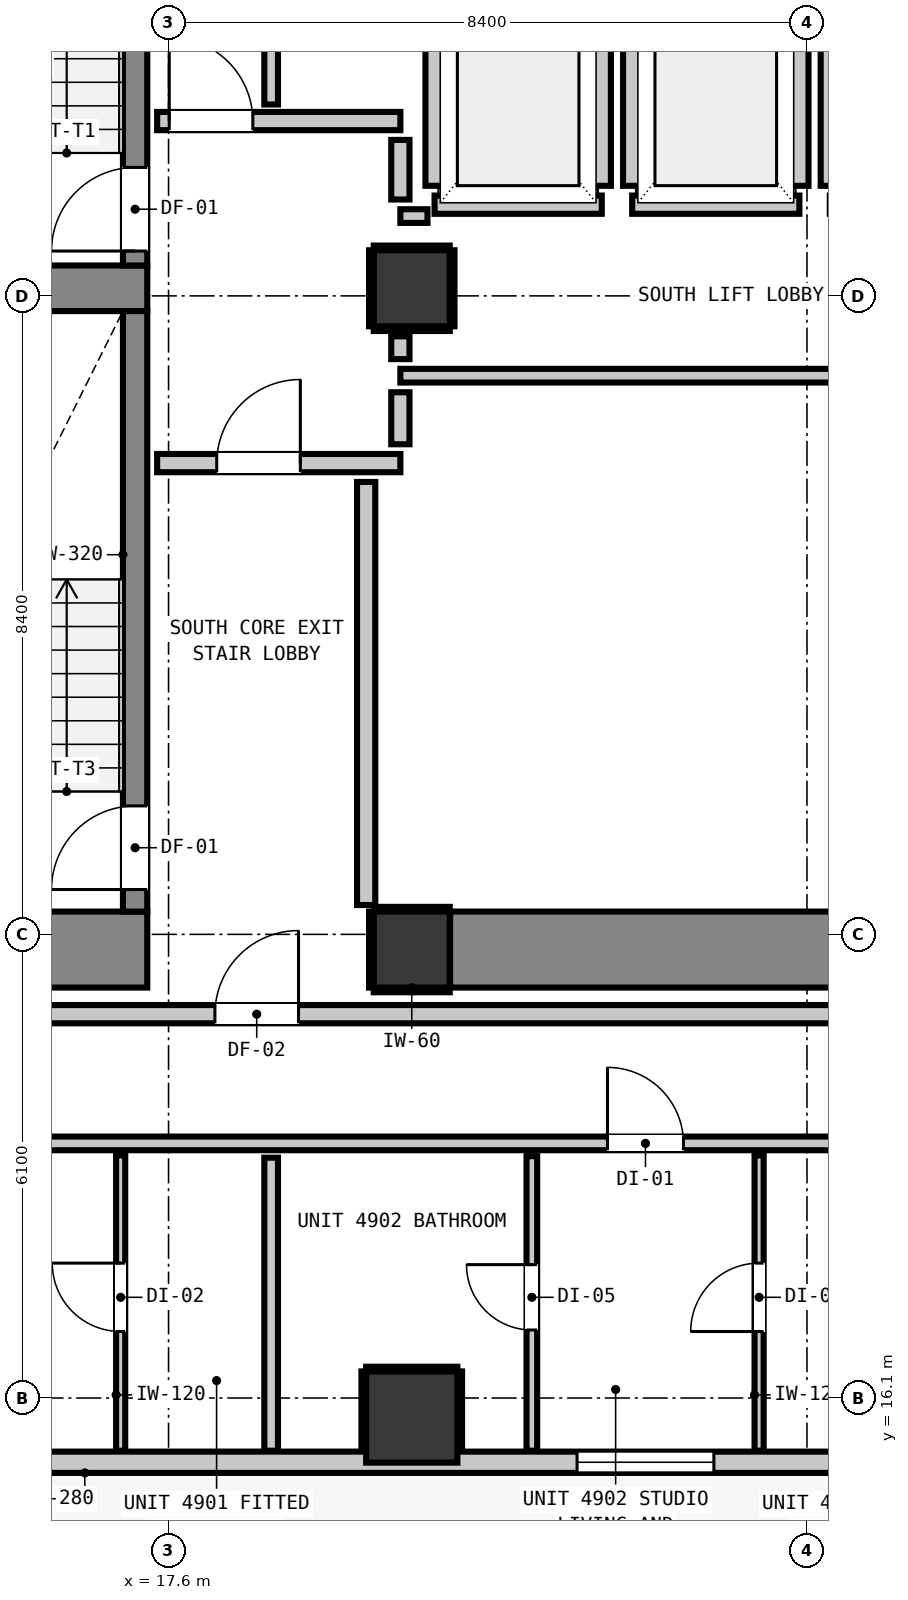
"""IFC4 building model, lengths in metres.
Left out: names, types, materials, properties, quantities, classifications, styles, units other than length and angle.
Written with IfcOpenShell. Run it as: python <this file> out.ifc"""

import sys

from ifc_helpers import new_model, si_unit, direction, frame, frame_2d, origin, origin_2d, place, context, subcontext, project, spatial, rectangle, extrude, element, fill, save


model = new_model("IFC4")
c1 = context("Model", 3, precision=1e-05, world=origin(), true_north=direction((0.0, 1.0)))
c2 = subcontext(c1, "Body", "Model", "MODEL_VIEW")
j1 = project(units=[si_unit("LENGTHUNIT", "METRE"), si_unit("PLANEANGLEUNIT", "RADIAN")], contexts=[c1])
p1 = place(None, origin())
s1 = spatial("IfcSite", under=j1, at=p1, CompositionType="ELEMENT")
p2 = place(p1, origin())
s2 = spatial("IfcBuilding", under=s1, at=p2, CompositionType="ELEMENT")
p3 = place(p2, frame((0.0, 0.0, 169.16)))
s3 = spatial("IfcBuildingStorey", under=s2, at=p3, CompositionType="ELEMENT", Elevation=169.16)
p4 = place(p3, frame((20.8, 22.0, 0.0), z_axis=(0.0, 0.0, 1.0), x_axis=(1.0, 0.0, 0.0)))
e1 = element("IfcColumn", 1, at=p4, inside=s3, PredefinedType="COLUMN", context=c2, shape_type="SweptSolid", body=[
    extrude(rectangle(XDim=1.0, YDim=1.0, at=origin_2d()), origin(), (0.0, 0.0, 1.0), 3.32),
])
p5 = place(p3, frame((13.24, 22.0, 0.0), z_axis=(0.0, 0.0, 1.0), x_axis=(1.0, 0.0, 0.0)))
e2 = element("IfcWall", 2, at=p5, inside=s3, PredefinedType="SHEAR", context=c2, shape_type="SweptSolid", body=[
    extrude(rectangle(XDim=4.08, YDim=1.0, at=frame_2d((2.04, 0.0))), origin(), (0.0, 0.0, 1.0), 3.32),
])
p6 = place(p3, frame((13.905, 30.7, 0.0), z_axis=(0.0, 0.0, 1.0), x_axis=(1.0, 0.0, 0.0)))
e3 = element("IfcWall", 3, at=p6, inside=s3, PredefinedType="SHEAR", context=c2, shape_type="SweptSolid", body=[
    extrude(rectangle(XDim=3.415, YDim=0.6, at=frame_2d((1.708, 0.0))), origin(), (0.0, 0.0, 1.0), 3.32),
])
p7 = place(p3, frame((21.305, 22.0, 0.0), z_axis=(0.0, 0.0, 1.0), x_axis=(1.0, 0.0, 0.0)))
e4 = element("IfcWall", 4, at=p7, inside=s3, PredefinedType="SHEAR", context=c2, shape_type="SweptSolid", body=[
    extrude(rectangle(XDim=7.39, YDim=1.0, at=frame_2d((3.695, 0.0))), origin(), (0.0, 0.0, 1.0), 3.32),
])
p8 = place(p3, frame((17.16, 31.0, 0.0), z_axis=(0.0, 0.0, 1.0), x_axis=(0.0, 1.0, 0.0)))
e5 = element("IfcWall", 5, at=p8, inside=s3, PredefinedType="SHEAR", context=c2, shape_type="SweptSolid", body=[
    extrude(rectangle(XDim=7.8, YDim=0.32, at=frame_2d((3.9, 0.0))), origin(), (0.0, 0.0, 1.0), 3.32),
])
p9 = place(p8, frame((0.19, 0.0, 0.0)))
e6 = element("IfcOpeningElement", 6, at=p9, cuts=e5, PredefinedType="OPENING", context=c2, shape_type="SweptSolid", body=[
    extrude(rectangle(XDim=1.1, YDim=2.15, at=frame_2d((0.55, 1.075))), frame((0.0, 0.17, 0.0), z_axis=(0.0, -1.0, 0.0), x_axis=(1.0, 0.0, 0.0)), (0.0, 0.0, 1.0), 0.34),
])
p10 = place(p3, frame((17.16, 22.5, 0.0), z_axis=(0.0, 0.0, 1.0), x_axis=(0.0, 1.0, 0.0)))
e7 = element("IfcWall", 7, at=p10, inside=s3, PredefinedType="SHEAR", context=c2, shape_type="SweptSolid", body=[
    extrude(rectangle(XDim=7.9, YDim=0.32, at=frame_2d((3.95, 0.0))), origin(), (0.0, 0.0, 1.0), 3.32),
])
p11 = place(p10, frame((0.29, 0.0, 0.0)))
e8 = element("IfcOpeningElement", 8, at=p11, cuts=e7, PredefinedType="OPENING", context=c2, shape_type="SweptSolid", body=[
    extrude(rectangle(XDim=1.1, YDim=2.15, at=frame_2d((0.55, 1.075))), frame((0.0, 0.17, 0.0), z_axis=(0.0, -1.0, 0.0), x_axis=(1.0, 0.0, 0.0)), (0.0, 0.0, 1.0), 0.34),
])
p12 = place(p3, frame((20.8, 30.7, 0.0), z_axis=(0.0, 0.0, 1.0), x_axis=(1.0, 0.0, 0.0)))
e9 = element("IfcColumn", 9, at=p12, inside=s3, PredefinedType="COLUMN", context=c2, shape_type="SweptSolid", body=[
    extrude(rectangle(XDim=1.0, YDim=1.0, at=origin_2d()), origin(), (0.0, 0.0, 1.0), 3.32),
])
p13 = place(p3, frame((20.8, 15.85, 0.0), z_axis=(0.0, 0.0, 1.0), x_axis=(1.0, 0.0, 0.0)))
e10 = element("IfcColumn", 10, at=p13, inside=s3, PredefinedType="COLUMN", context=c2, shape_type="SweptSolid", body=[
    extrude(rectangle(XDim=1.2, YDim=1.2, at=origin_2d()), origin(), (0.0, 0.0, 1.0), 3.32),
])
p14 = place(p3, frame((40.445, 15.255, 0.0), z_axis=(0.0, 0.0, 1.0), x_axis=(-1.0, 0.0, 0.0)))
e11 = element("IfcWall", 11, at=p14, inside=s3, PredefinedType="STANDARD", context=c2, shape_type="SweptSolid", body=[
    extrude(rectangle(XDim=35.09, YDim=0.28, at=frame_2d((17.545, 0.0))), origin(), (0.0, 0.0, 1.0), 2.96),
])
p15 = place(p14, frame((0.904, 0.0, 0.0)))
e12 = element("IfcOpeningElement", 12, at=p15, cuts=e11, PredefinedType="OPENING", context=c2, shape_type="SweptSolid", body=[
    extrude(rectangle(XDim=1.0, YDim=2.15, at=frame_2d((0.5, 1.075))), frame((0.0, 0.15, 0.0), z_axis=(0.0, -1.0, 0.0), x_axis=(1.0, 0.0, 0.0)), (0.0, 0.0, 1.0), 0.3),
])
p16 = place(p14, frame((30.423, 0.0, 0.85)))
e13 = element("IfcOpeningElement", 13, at=p16, cuts=e11, PredefinedType="OPENING", context=c2, shape_type="SweptSolid", body=[
    extrude(rectangle(XDim=1.8, YDim=1.9, at=frame_2d((0.9, 0.95))), frame((0.0, 0.15, 0.0), z_axis=(0.0, -1.0, 0.0), x_axis=(1.0, 0.0, 0.0)), (0.0, 0.0, 1.0), 0.3),
])
p17 = place(p14, frame((15.67, 0.0, 0.85)))
e14 = element("IfcOpeningElement", 14, at=p17, cuts=e11, PredefinedType="OPENING", context=c2, shape_type="SweptSolid", body=[
    extrude(rectangle(XDim=1.8, YDim=1.9, at=frame_2d((0.9, 0.95))), frame((0.0, 0.15, 0.0), z_axis=(0.0, -1.0, 0.0), x_axis=(1.0, 0.0, 0.0)), (0.0, 0.0, 1.0), 0.3),
])
p18 = place(p14, frame((6.155, 0.0, 0.85)))
e15 = element("IfcOpeningElement", 15, at=p18, cuts=e11, PredefinedType="OPENING", context=c2, shape_type="SweptSolid", body=[
    extrude(rectangle(XDim=1.8, YDim=1.9, at=frame_2d((0.9, 0.95))), frame((0.0, 0.15, 0.0), z_axis=(0.0, -1.0, 0.0), x_axis=(1.0, 0.0, 0.0)), (0.0, 0.0, 1.0), 0.3),
])
p19 = place(p3, frame((21.1, 31.8, 0.0), z_axis=(0.0, 0.0, 1.0), x_axis=(1.0, 0.0, 0.0)))
e16 = element("IfcWall", 16, at=p19, inside=s3, PredefinedType="PARTITIONING", context=c2, shape_type="SweptSolid", body=[
    extrude(rectangle(XDim=2.2, YDim=0.24, at=frame_2d((1.1, 0.0))), origin(), (0.0, 0.0, 1.0), 2.96),
])
p20 = place(p3, frame((21.1, 32.048, 0.0), z_axis=(0.0, 0.0, 1.0), x_axis=(0.0, 1.0, 0.0)))
e17 = element("IfcWall", 17, at=p20, inside=s3, PredefinedType="PARTITIONING", context=c2, shape_type="SweptSolid", body=[
    extrude(rectangle(XDim=2.104, YDim=0.24, at=frame_2d((1.052, 0.0))), origin(), (0.0, 0.0, 1.0), 2.195),
])
p21 = place(p3, frame((23.3, 32.048, 0.0), z_axis=(0.0, 0.0, 1.0), x_axis=(0.0, 1.0, 0.0)))
e18 = element("IfcWall", 18, at=p21, inside=s3, PredefinedType="PARTITIONING", context=c2, shape_type="SweptSolid", body=[
    extrude(rectangle(XDim=2.104, YDim=0.24, at=frame_2d((1.052, 0.0))), origin(), (0.0, 0.0, 1.0), 2.96),
])
p22 = place(p3, frame((23.7, 31.8, 0.0), z_axis=(0.0, 0.0, 1.0), x_axis=(1.0, 0.0, 0.0)))
e19 = element("IfcWall", 19, at=p22, inside=s3, PredefinedType="PARTITIONING", context=c2, shape_type="SweptSolid", body=[
    extrude(rectangle(XDim=2.2, YDim=0.24, at=frame_2d((1.1, 0.0))), origin(), (0.0, 0.0, 1.0), 2.96),
])
for number, where, z_axis, x_axis in (
    (20, (23.7, 32.048, 0.0), (0.0, 0.0, 1.0), (0.0, 1.0, 0.0)),
    (21, (25.9, 32.048, 0.0), (0.0, 0.0, 1.0), (0.0, 1.0, 0.0)),
    (22, (26.3, 32.048, 0.0), (0.0, 0.0, 1.0), (0.0, 1.0, 0.0)),
):
    element("IfcWall", number, at=place(p3, frame(where, z_axis=z_axis, x_axis=x_axis)), inside=s3, PredefinedType="PARTITIONING", context=c2, shape_type="SweptSolid", body=[
        extrude(rectangle(XDim=2.104, YDim=0.24, at=frame_2d((1.052, 0.0))), origin(), (0.0, 0.0, 1.0), 2.96),
    ])
p23 = place(p3, frame((12.983, 21.15, 0.0), z_axis=(0.0, 0.0, 1.0), x_axis=(1.0, 0.0, 0.0)))
e23 = element("IfcWall", 23, at=p23, inside=s3, PredefinedType="PARTITIONING", context=c2, shape_type="SweptSolid", body=[
    extrude(rectangle(XDim=29.61, YDim=0.24, at=frame_2d((14.805, 0.0))), origin(), (0.0, 0.0, 1.0), 2.96),
])
p24 = place(p23, frame((5.227, 0.0, 0.0)))
e24 = element("IfcOpeningElement", 24, at=p24, cuts=e23, PredefinedType="OPENING", context=c2, shape_type="SweptSolid", body=[
    extrude(rectangle(XDim=1.1, YDim=2.15, at=frame_2d((0.55, 1.075))), frame((0.0, 0.13, 0.0), z_axis=(0.0, -1.0, 0.0), x_axis=(1.0, 0.0, 0.0)), (0.0, 0.0, 1.0), 0.26),
])
p25 = place(p23, frame((25.067, 0.0, 0.0)))
e25 = element("IfcOpeningElement", 25, at=p25, cuts=e23, PredefinedType="OPENING", context=c2, shape_type="SweptSolid", body=[
    extrude(rectangle(XDim=1.4, YDim=2.15, at=frame_2d((0.7, 1.075))), frame((0.0, 0.13, 0.0), z_axis=(0.0, -1.0, 0.0), x_axis=(1.0, 0.0, 0.0)), (0.0, 0.0, 1.0), 0.26),
])
p26 = place(p3, frame((17.45, 28.4, 0.0), z_axis=(0.0, 0.0, 1.0), x_axis=(1.0, 0.0, 0.0)))
e26 = element("IfcWall", 26, at=p26, inside=s3, PredefinedType="PARTITIONING", context=c2, shape_type="SweptSolid", body=[
    extrude(rectangle(XDim=3.2, YDim=0.24, at=frame_2d((1.6, 0.0))), origin(), (0.0, 0.0, 1.0), 2.96),
])
p27 = place(p26, frame((0.784, 0.0, 0.0)))
e27 = element("IfcOpeningElement", 27, at=p27, cuts=e26, PredefinedType="OPENING", context=c2, shape_type="SweptSolid", body=[
    extrude(rectangle(XDim=1.1, YDim=2.15, at=frame_2d((0.55, 1.075))), frame((0.0, 0.13, 0.0), z_axis=(0.0, -1.0, 0.0), x_axis=(1.0, 0.0, 0.0)), (0.0, 0.0, 1.0), 0.26),
])
p28 = place(p3, frame((17.45, 32.9, 0.0), z_axis=(0.0, 0.0, 1.0), x_axis=(1.0, 0.0, 0.0)))
e28 = element("IfcWall", 28, at=p28, inside=s3, PredefinedType="PARTITIONING", context=c2, shape_type="SweptSolid", body=[
    extrude(rectangle(XDim=3.2, YDim=0.24, at=frame_2d((1.6, 0.0))), origin(), (0.0, 0.0, 1.0), 2.96),
])
p29 = place(p28, frame((0.159, 0.0, 0.0)))
e29 = element("IfcOpeningElement", 29, at=p29, cuts=e28, PredefinedType="OPENING", context=c2, shape_type="SweptSolid", body=[
    extrude(rectangle(XDim=1.1, YDim=2.15, at=frame_2d((0.55, 1.075))), frame((0.0, 0.13, 0.0), z_axis=(0.0, -1.0, 0.0), x_axis=(1.0, 0.0, 0.0)), (0.0, 0.0, 1.0), 0.26),
])
p30 = place(p3, frame((12.983, 19.45, 0.0), z_axis=(0.0, 0.0, 1.0), x_axis=(1.0, 0.0, 0.0)))
e30 = element("IfcWall", 30, at=p30, inside=s3, PredefinedType="PARTITIONING", context=c2, shape_type="SweptSolid", body=[
    extrude(rectangle(XDim=29.61, YDim=0.18, at=frame_2d((14.805, 0.0))), origin(), (0.0, 0.0, 1.0), 2.96),
])
p31 = place(p30, frame((10.392, 0.0, 0.0)))
e31 = element("IfcOpeningElement", 31, at=p31, cuts=e30, PredefinedType="OPENING", context=c2, shape_type="SweptSolid", body=[
    extrude(rectangle(XDim=1.0, YDim=2.15, at=frame_2d((0.5, 1.075))), frame((0.0, 0.1, 0.0), z_axis=(0.0, -1.0, 0.0), x_axis=(1.0, 0.0, 0.0)), (0.0, 0.0, 1.0), 0.2),
])
p32 = place(p30, frame((22.132, 0.0, 0.0)))
e32 = element("IfcOpeningElement", 32, at=p32, cuts=e30, PredefinedType="OPENING", context=c2, shape_type="SweptSolid", body=[
    extrude(rectangle(XDim=1.0, YDim=2.15, at=frame_2d((0.5, 1.075))), frame((0.0, 0.1, 0.0), z_axis=(0.0, -1.0, 0.0), x_axis=(1.0, 0.0, 0.0)), (0.0, 0.0, 1.0), 0.2),
])
p33 = place(p3, frame((20.65, 29.55, 0.0), z_axis=(0.0, 0.0, 1.0), x_axis=(1.0, 0.0, 0.0)))
e33 = element("IfcWall", 33, at=p33, inside=s3, PredefinedType="PARTITIONING", context=c2, shape_type="SweptSolid", body=[
    extrude(rectangle(XDim=9.325, YDim=0.18, at=frame_2d((4.663, 0.0))), origin(), (0.0, 0.0, 1.0), 2.96),
])
p34 = place(p3, frame((20.65, 31.65, 0.0), z_axis=(0.0, 0.0, 1.0), x_axis=(1.0, 0.0, 0.0)))
e34 = element("IfcWall", 34, at=p34, inside=s3, PredefinedType="PARTITIONING", context=c2, shape_type="SweptSolid", body=[
    extrude(rectangle(XDim=0.357, YDim=0.18, at=frame_2d((0.179, 0.0))), origin(), (0.0, 0.0, 1.0), 2.96),
])
p35 = place(p3, frame((20.2, 22.586, 0.0), z_axis=(0.0, 0.0, 1.0), x_axis=(0.0, 1.0, 0.0)))
e35 = element("IfcWall", 35, at=p35, inside=s3, PredefinedType="PARTITIONING", context=c2, shape_type="SweptSolid", body=[
    extrude(rectangle(XDim=5.566, YDim=0.24, at=frame_2d((2.783, 0.0))), origin(), (0.0, 0.0, 1.0), 2.96),
])
p36 = place(p3, frame((20.65, 28.648, 0.0), z_axis=(0.0, 0.0, 1.0), x_axis=(0.0, 1.0, 0.0)))
e36 = element("IfcWall", 36, at=p36, inside=s3, PredefinedType="PARTITIONING", context=c2, shape_type="SweptSolid", body=[
    extrude(rectangle(XDim=0.684, YDim=0.24, at=frame_2d((0.342, 0.0))), origin(), (0.0, 0.0, 1.0), 2.195),
])
p37 = place(p3, frame((20.65, 29.768, 0.0), z_axis=(0.0, 0.0, 1.0), x_axis=(0.0, 1.0, 0.0)))
e37 = element("IfcWall", 37, at=p37, inside=s3, PredefinedType="PARTITIONING", context=c2, shape_type="SweptSolid", body=[
    extrude(rectangle(XDim=0.3, YDim=0.24, at=frame_2d((0.15, 0.0))), origin(), (0.0, 0.0, 1.0), 2.195),
])
p38 = place(p3, frame((20.65, 31.868, 0.0), z_axis=(0.0, 0.0, 1.0), x_axis=(0.0, 1.0, 0.0)))
e38 = element("IfcWall", 38, at=p38, inside=s3, PredefinedType="PARTITIONING", context=c2, shape_type="SweptSolid", body=[
    extrude(rectangle(XDim=0.784, YDim=0.24, at=frame_2d((0.392, 0.0))), origin(), (0.0, 0.0, 1.0), 2.195),
])
p39 = place(p3, frame((18.95, 15.407, 0.0), z_axis=(0.0, 0.0, 1.0), x_axis=(0.0, 1.0, 0.0)))
e39 = element("IfcWall", 39, at=p39, inside=s3, PredefinedType="PARTITIONING", context=c2, shape_type="SweptSolid", body=[
    extrude(rectangle(XDim=3.855, YDim=0.18, at=frame_2d((1.927, 0.0))), origin(), (0.0, 0.0, 1.0), 2.96),
])
p40 = place(p3, frame((18.95, 33.118, 0.0), z_axis=(0.0, 0.0, 1.0), x_axis=(0.0, 1.0, 0.0)))
e40 = element("IfcWall", 40, at=p40, inside=s3, PredefinedType="PARTITIONING", context=c2, shape_type="SweptSolid", body=[
    extrude(rectangle(XDim=2.374, YDim=0.18, at=frame_2d((1.187, 0.0))), origin(), (0.0, 0.0, 1.0), 2.96),
])
p41 = place(p3, frame((22.38, 15.407, 0.0), z_axis=(0.0, 0.0, 1.0), x_axis=(0.0, 1.0, 0.0)))
e41 = element("IfcWall", 41, at=p41, inside=s3, PredefinedType="PARTITIONING", context=c2, shape_type="SweptSolid", body=[
    extrude(rectangle(XDim=3.875, YDim=0.14, at=frame_2d((1.938, 0.0))), origin(), (0.0, 0.0, 1.0), 2.96),
])
p42 = place(p41, frame((1.588, 0.0, 0.0)))
e42 = element("IfcOpeningElement", 42, at=p42, cuts=e41, PredefinedType="OPENING", context=c2, shape_type="SweptSolid", body=[
    extrude(rectangle(XDim=0.86, YDim=2.02, at=frame_2d((0.43, 1.01))), frame((0.0, 0.08, 0.0), z_axis=(0.0, -1.0, 0.0), x_axis=(1.0, 0.0, 0.0)), (0.0, 0.0, 1.0), 0.16),
])
p43 = place(p3, frame((16.97, 15.407, 0.0), z_axis=(0.0, 0.0, 1.0), x_axis=(0.0, 1.0, 0.0)))
e43 = element("IfcWall", 43, at=p43, inside=s3, PredefinedType="PARTITIONING", context=c2, shape_type="SweptSolid", body=[
    extrude(rectangle(XDim=3.885, YDim=0.12, at=frame_2d((1.942, 0.0))), origin(), (0.0, 0.0, 1.0), 2.96),
])
p44 = place(p43, frame((1.568, 0.0, 0.0)))
e44 = element("IfcOpeningElement", 44, at=p44, cuts=e43, PredefinedType="OPENING", context=c2, shape_type="SweptSolid", body=[
    extrude(rectangle(XDim=0.9, YDim=2.1, at=frame_2d((0.45, 1.05))), frame((0.0, 0.07, 0.0), z_axis=(0.0, -1.0, 0.0), x_axis=(1.0, 0.0, 0.0)), (0.0, 0.0, 1.0), 0.14),
])
p45 = place(p3, frame((25.37, 15.407, 0.0), z_axis=(0.0, 0.0, 1.0), x_axis=(0.0, 1.0, 0.0)))
e45 = element("IfcWall", 45, at=p45, inside=s3, PredefinedType="PARTITIONING", context=c2, shape_type="SweptSolid", body=[
    extrude(rectangle(XDim=3.885, YDim=0.12, at=frame_2d((1.942, 0.0))), origin(), (0.0, 0.0, 1.0), 2.96),
])
p46 = place(p45, frame((1.568, 0.0, 0.0)))
e46 = element("IfcOpeningElement", 46, at=p46, cuts=e45, PredefinedType="OPENING", context=c2, shape_type="SweptSolid", body=[
    extrude(rectangle(XDim=0.9, YDim=2.1, at=frame_2d((0.45, 1.05))), frame((0.0, 0.07, 0.0), z_axis=(0.0, -1.0, 0.0), x_axis=(1.0, 0.0, 0.0)), (0.0, 0.0, 1.0), 0.14),
])
for number, where, z_axis, x_axis in (
    (47, (20.3, 21.468, 0.0), (0.0, 0.0, 1.0), (1.0, 0.0, 0.0)),
    (48, (20.3, 22.532, 0.0), (0.0, 0.0, 1.0), (1.0, 0.0, 0.0)),
    (49, (20.268, 21.5, 0.0), (0.0, 0.0, 1.0), (0.0, 1.0, 0.0)),
    (50, (20.3, 30.168, 0.0), (0.0, 0.0, 1.0), (1.0, 0.0, 0.0)),
    (51, (20.3, 31.232, 0.0), (0.0, 0.0, 1.0), (1.0, 0.0, 0.0)),
    (52, (20.268, 30.2, 0.0), (0.0, 0.0, 1.0), (0.0, 1.0, 0.0)),
    (53, (21.332, 30.2, 0.0), (0.0, 0.0, 1.0), (0.0, 1.0, 0.0)),
):
    element("IfcWall", number, at=place(p3, frame(where, z_axis=z_axis, x_axis=x_axis)), inside=s3, PredefinedType="PARTITIONING", context=c2, shape_type="SweptSolid", body=[
        extrude(rectangle(XDim=1.0, YDim=0.06, at=frame_2d((0.5, 0.0))), origin(), (0.0, 0.0, 1.0), 1.45),
    ])
p47 = place(p3, frame((20.2, 16.482, 0.0), z_axis=(0.0, 0.0, 1.0), x_axis=(1.0, 0.0, 0.0)))
e54 = element("IfcWall", 54, at=p47, inside=s3, PredefinedType="PARTITIONING", context=c2, shape_type="SweptSolid", body=[
    extrude(rectangle(XDim=1.2, YDim=0.06, at=frame_2d((0.6, 0.0))), origin(), (0.0, 0.0, 1.0), 1.45),
])
for number, where, z_axis, x_axis in (
    (55, (20.168, 15.41, 0.0), (0.0, 0.0, 1.0), (0.0, 1.0, 0.0)),
    (56, (21.432, 15.41, 0.0), (0.0, 0.0, 1.0), (0.0, 1.0, 0.0)),
):
    element("IfcWall", number, at=place(p3, frame(where, z_axis=z_axis, x_axis=x_axis)), inside=s3, PredefinedType="PARTITIONING", context=c2, shape_type="SweptSolid", body=[
        extrude(rectangle(XDim=1.04, YDim=0.06, at=frame_2d((0.52, 0.0))), origin(), (0.0, 0.0, 1.0), 1.45),
    ])
p48 = place(p17, origin())
e57 = element("IfcWindow", 57, at=p48, inside=s3, PartitioningType="SINGLE_PANEL", PredefinedType="WINDOW", context=c2, shape_type="SweptSolid", body=[
    extrude(rectangle(XDim=1.8, YDim=1.9, at=frame_2d((0.9, 0.95))), frame((0.0, 0.03, 0.0), z_axis=(0.0, -1.0, 0.0), x_axis=(1.0, 0.0, 0.0)), (0.0, 0.0, 1.0), 0.06),
])
fill(e14, e57)
p49 = place(p9, origin())
e58 = element("IfcDoor", 58, at=p49, inside=s3, OperationType="SINGLE_SWING_LEFT", PredefinedType="DOOR", context=c2, shape_type="SweptSolid", body=[
    extrude(rectangle(XDim=1.1, YDim=2.15, at=frame_2d((0.55, 1.075))), frame((0.0, 0.025, 0.0), z_axis=(0.0, -1.0, 0.0), x_axis=(1.0, 0.0, 0.0)), (0.0, 0.0, 1.0), 0.05),
])
fill(e6, e58)
p50 = place(p11, origin())
e59 = element("IfcDoor", 59, at=p50, inside=s3, OperationType="SINGLE_SWING_LEFT", PredefinedType="DOOR", context=c2, shape_type="SweptSolid", body=[
    extrude(rectangle(XDim=1.1, YDim=2.15, at=frame_2d((0.55, 1.075))), frame((0.0, 0.025, 0.0), z_axis=(0.0, -1.0, 0.0), x_axis=(1.0, 0.0, 0.0)), (0.0, 0.0, 1.0), 0.05),
])
fill(e8, e59)
p51 = place(p27, origin())
e60 = element("IfcDoor", 60, at=p51, inside=s3, OperationType="SINGLE_SWING_RIGHT", PredefinedType="DOOR", context=c2, shape_type="SweptSolid", body=[
    extrude(rectangle(XDim=1.1, YDim=2.15, at=frame_2d((0.55, 1.075))), frame((0.0, 0.025, 0.0), z_axis=(0.0, -1.0, 0.0), x_axis=(1.0, 0.0, 0.0)), (0.0, 0.0, 1.0), 0.05),
])
fill(e27, e60)
p52 = place(p29, origin())
e61 = element("IfcDoor", 61, at=p52, inside=s3, OperationType="SINGLE_SWING_LEFT", PredefinedType="DOOR", context=c2, shape_type="SweptSolid", body=[
    extrude(rectangle(XDim=1.1, YDim=2.15, at=frame_2d((0.55, 1.075))), frame((0.0, 0.025, 0.0), z_axis=(0.0, -1.0, 0.0), x_axis=(1.0, 0.0, 0.0)), (0.0, 0.0, 1.0), 0.05),
])
fill(e29, e61)
p53 = place(p24, origin())
e62 = element("IfcDoor", 62, at=p53, inside=s3, OperationType="SINGLE_SWING_RIGHT", PredefinedType="DOOR", context=c2, shape_type="SweptSolid", body=[
    extrude(rectangle(XDim=1.1, YDim=2.15, at=frame_2d((0.55, 1.075))), frame((0.0, 0.025, 0.0), z_axis=(0.0, -1.0, 0.0), x_axis=(1.0, 0.0, 0.0)), (0.0, 0.0, 1.0), 0.05),
])
fill(e24, e62)
p54 = place(p44, origin())
e63 = element("IfcDoor", 63, at=p54, inside=s3, OperationType="SINGLE_SWING_RIGHT", PredefinedType="DOOR", context=c2, shape_type="SweptSolid", body=[
    extrude(rectangle(XDim=0.9, YDim=2.1, at=frame_2d((0.45, 1.05))), frame((0.0, 0.025, 0.0), z_axis=(0.0, -1.0, 0.0), x_axis=(1.0, 0.0, 0.0)), (0.0, 0.0, 1.0), 0.05),
])
fill(e44, e63)
p55 = place(p31, origin())
e64 = element("IfcDoor", 64, at=p55, inside=s3, OperationType="SINGLE_SWING_LEFT", PredefinedType="DOOR", context=c2, shape_type="SweptSolid", body=[
    extrude(rectangle(XDim=1.0, YDim=2.15, at=frame_2d((0.5, 1.075))), frame((0.0, 0.025, 0.0), z_axis=(0.0, -1.0, 0.0), x_axis=(1.0, 0.0, 0.0)), (0.0, 0.0, 1.0), 0.05),
])
fill(e31, e64)
p56 = place(p42, origin())
e65 = element("IfcDoor", 65, at=p56, inside=s3, OperationType="SINGLE_SWING_RIGHT", PredefinedType="DOOR", context=c2, shape_type="SweptSolid", body=[
    extrude(rectangle(XDim=0.86, YDim=2.02, at=frame_2d((0.43, 1.01))), frame((0.0, 0.025, 0.0), z_axis=(0.0, -1.0, 0.0), x_axis=(1.0, 0.0, 0.0)), (0.0, 0.0, 1.0), 0.05),
])
fill(e42, e65)
p57 = place(p46, origin())
e66 = element("IfcDoor", 66, at=p57, inside=s3, OperationType="SINGLE_SWING_LEFT", PredefinedType="DOOR", context=c2, shape_type="SweptSolid", body=[
    extrude(rectangle(XDim=0.9, YDim=2.1, at=frame_2d((0.45, 1.05))), frame((0.0, 0.025, 0.0), z_axis=(0.0, -1.0, 0.0), x_axis=(1.0, 0.0, 0.0)), (0.0, 0.0, 1.0), 0.05),
])
fill(e46, e66)
save(model, sys.argv[1])
